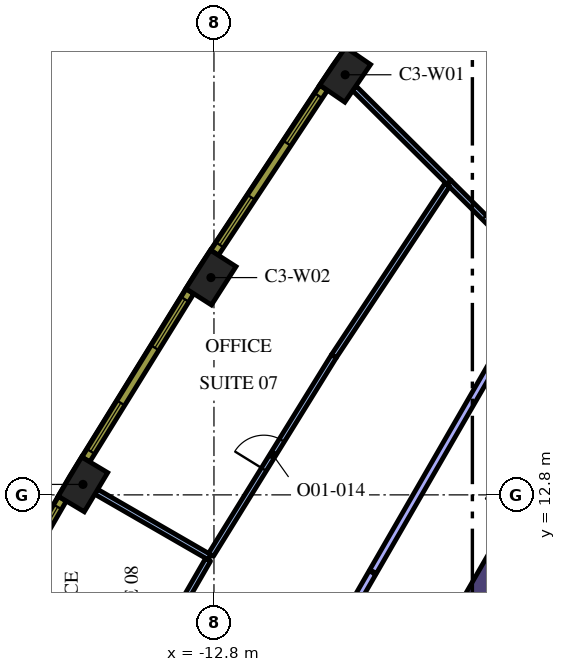
"""IFC4 building model, lengths in metres.
Left out: names, types, materials, properties, quantities, classifications, styles, units other than length and angle.
Written with IfcOpenShell. Run it as: python <this file> out.ifc"""

import sys

from ifc_helpers import new_model, si_unit, direction, frame, frame_2d, origin, origin_2d, place, context, subcontext, project, spatial, rectangle, extrude, element, fill, save


model = new_model("IFC4")
c1 = context("Model", 3, precision=1e-05, world=origin(), true_north=direction((0.0, 1.0)))
c2 = subcontext(c1, "Body", "Model", "MODEL_VIEW")
j1 = project(units=[si_unit("LENGTHUNIT", "METRE"), si_unit("PLANEANGLEUNIT", "RADIAN")], contexts=[c1])
p1 = place(None, origin())
s1 = spatial("IfcSite", under=j1, at=p1, CompositionType="ELEMENT")
p2 = place(p1, origin())
s2 = spatial("IfcBuilding", under=s1, at=p2, CompositionType="ELEMENT")
p3 = place(p2, frame((0.0, 0.0, 145.8)))
s3 = spatial("IfcBuildingStorey", under=s2, at=p3, CompositionType="ELEMENT", Elevation=145.8)
for number, where, z_axis, x_axis in (
    (1, (-9.348, 23.854, 0.0), (0.0, 0.0, 1.0), (-0.565, -0.825, 0.0)),
    (2, (-12.88, 18.517, 0.0), (0.0, 0.0, 1.0), (-0.539, -0.842, 0.0)),
    (3, (-16.247, 13.075, 0.0), (0.0, 0.0, 1.0), (-0.513, -0.858, 0.0)),
):
    element("IfcColumn", number, at=place(p3, frame(where, z_axis=z_axis, x_axis=x_axis)), inside=s3, PredefinedType="COLUMN", context=c2, shape_type="SweptSolid", body=[
        extrude(rectangle(XDim=1.2, YDim=0.8, at=origin_2d()), origin(), (0.0, 0.0, 1.0), 4.2),
    ])
p4 = place(p3, frame((-12.668, -1.842, 0.0), z_axis=(0.0, 0.0, 1.0), x_axis=(0.500003640647, 0.866023301845, 0.0)))
e4 = element("IfcWall", 4, at=p4, inside=s3, PredefinedType="SOLIDWALL", context=c2, shape_type="SweptSolid", body=[
    extrude(rectangle(XDim=15.858, YDim=0.8, at=frame_2d((7.929, 0.0))), origin(), (0.0, 0.0, 1.0), 4.2),
])
p5 = place(p3, frame((-6.613, 21.021, 0.0), z_axis=(0.0, 0.0, 1.0), x_axis=(-0.709222036241, 0.704985179497, 0.0)))
e5 = element("IfcWall", 5, at=p5, inside=s3, PredefinedType="PARTITIONING", context=c2, shape_type="SweptSolid", body=[
    extrude(rectangle(XDim=3.515, YDim=0.15, at=frame_2d((1.757, 0.0))), origin(), (0.0, 0.0, 1.0), 3.15),
])
p6 = place(p3, frame((-6.619, 21.027, 0.0), z_axis=(0.0, 0.0, 1.0), x_axis=(0.709188943058, -0.705018470002, 0.0)))
e6 = element("IfcWall", 6, at=p6, inside=s3, PredefinedType="PARTITIONING", context=c2, shape_type="SweptSolid", body=[
    extrude(rectangle(XDim=3.512, YDim=0.15, at=frame_2d((1.756, 0.0))), origin(), (0.0, 0.0, 1.0), 3.15),
])
p7 = place(p6, frame((1.312, 0.0, 0.0)))
e7 = element("IfcOpeningElement", 7, at=p7, cuts=e6, PredefinedType="OPENING", context=c2, shape_type="SweptSolid", body=[
    extrude(rectangle(XDim=0.9, YDim=2.1, at=frame_2d((0.45, 1.05))), frame((0.0, 0.085, 0.0), z_axis=(0.0, -1.0, 0.0), x_axis=(1.0, 0.0, 0.0)), (0.0, 0.0, 1.0), 0.17),
])
p8 = place(p3, frame((-12.917, 11.16, 0.0), z_axis=(0.0, 0.0, 1.0), x_axis=(-0.866039125629, 0.499976232315, 0.0)))
e8 = element("IfcWall", 8, at=p8, inside=s3, PredefinedType="PARTITIONING", context=c2, shape_type="SweptSolid", body=[
    extrude(rectangle(XDim=3.442, YDim=0.15, at=frame_2d((1.721, 0.0))), origin(), (0.0, 0.0, 1.0), 3.15),
])
p9 = place(p3, frame((-6.658, 20.96, 0.0), z_axis=(0.0, 0.0, 1.0), x_axis=(-0.551907039463, -0.833905642019, 0.0)))
e9 = element("IfcWall", 9, at=p9, inside=s3, PredefinedType="PARTITIONING", context=c2, shape_type="SweptSolid", body=[
    extrude(rectangle(XDim=5.412, YDim=0.15, at=frame_2d((2.706, 0.0))), origin(), (0.0, 0.0, 1.0), 3.15),
])
p10 = place(p3, frame((-12.877, 11.224, 0.0), z_axis=(0.0, 0.0, 1.0), x_axis=(0.526202711334, 0.850359163286, 0.0)))
e10 = element("IfcWall", 10, at=p10, inside=s3, PredefinedType="PARTITIONING", context=c2, shape_type="SweptSolid", body=[
    extrude(rectangle(XDim=6.142, YDim=0.15, at=frame_2d((3.071, 0.0))), origin(), (0.0, 0.0, 1.0), 3.15),
])
p11 = place(p10, frame((2.642, 0.0, 0.0)))
e11 = element("IfcOpeningElement", 11, at=p11, cuts=e10, PredefinedType="OPENING", context=c2, shape_type="SweptSolid", body=[
    extrude(rectangle(XDim=0.9, YDim=2.1, at=frame_2d((0.45, 1.05))), frame((0.0, 0.085, 0.0), z_axis=(0.0, -1.0, 0.0), x_axis=(1.0, 0.0, 0.0)), (0.0, 0.0, 1.0), 0.17),
])
p12 = place(p3, frame((-12.954, 11.095, 0.0), z_axis=(0.0, 0.0, 1.0), x_axis=(-0.500282785331, -0.865862076027, 0.0)))
e12 = element("IfcWall", 12, at=p12, inside=s3, PredefinedType="PARTITIONING", context=c2, shape_type="SweptSolid", body=[
    extrude(rectangle(XDim=6.273, YDim=0.15, at=frame_2d((3.136, 0.0))), origin(), (0.0, 0.0, 1.0), 3.15),
])
p13 = place(p3, frame((-8.628, 10.755, 0.0), z_axis=(0.0, 0.0, 1.0), x_axis=(-0.500004234368, -0.866022959057, 0.0)))
e13 = element("IfcWall", 13, at=p13, inside=s3, PredefinedType="PARTITIONING", context=c2, shape_type="SweptSolid", body=[
    extrude(rectangle(XDim=10.0, YDim=0.2, at=frame_2d((5.0, 0.0))), origin(), (0.0, 0.0, 1.0), 3.15),
])
p14 = place(p13, frame((4.5, 0.0, 0.0)))
e14 = element("IfcOpeningElement", 14, at=p14, cuts=e13, PredefinedType="OPENING", context=c2, shape_type="SweptSolid", body=[
    extrude(rectangle(XDim=1.0, YDim=2.1, at=frame_2d((0.5, 1.05))), frame((0.0, 0.11, 0.0), z_axis=(0.0, -1.0, 0.0), x_axis=(1.0, 0.0, 0.0)), (0.0, 0.0, 1.0), 0.22),
])
p15 = place(p3, frame((-4.167, 18.483, 0.0), z_axis=(0.0, 0.0, 1.0), x_axis=(-0.499974340325, -0.866040217898, 0.0)))
e15 = element("IfcWall", 15, at=p15, inside=s3, PredefinedType="PARTITIONING", context=c2, shape_type="SweptSolid", body=[
    extrude(rectangle(XDim=8.894, YDim=0.2, at=frame_2d((4.447, 0.0))), origin(), (0.0, 0.0, 1.0), 3.15),
])
p16 = place(p3, frame((-6.223, 28.762, 0.0), z_axis=(0.0, 0.0, 1.0), x_axis=(-0.577115207679, -0.816662743772, 0.0)))
e16 = element("IfcWall", 16, at=p16, inside=s3, PredefinedType="SOLIDWALL", context=c2, shape_type="SweptSolid", body=[
    extrude(rectangle(XDim=5.213, YDim=0.24, at=frame_2d((2.606, 0.0))), origin(), (0.0, 0.0, 1.0), 3.95),
])
p17 = place(p16, frame((0.221, 0.0, 0.9)))
e17 = element("IfcOpeningElement", 17, at=p17, cuts=e16, PredefinedType="OPENING", context=c2, shape_type="SweptSolid", body=[
    extrude(rectangle(XDim=1.5, YDim=2.55, at=frame_2d((0.75, 1.275))), frame((0.0, 0.13, 0.0), z_axis=(0.0, -1.0, 0.0), x_axis=(1.0, 0.0, 0.0)), (0.0, 0.0, 1.0), 0.26),
])
p18 = place(p16, frame((3.452, 0.0, 0.9)))
e18 = element("IfcOpeningElement", 18, at=p18, cuts=e16, PredefinedType="OPENING", context=c2, shape_type="SweptSolid", body=[
    extrude(rectangle(XDim=1.5, YDim=2.55, at=frame_2d((0.75, 1.275))), frame((0.0, 0.13, 0.0), z_axis=(0.0, -1.0, 0.0), x_axis=(1.0, 0.0, 0.0)), (0.0, 0.0, 1.0), 0.26),
])
p19 = place(p3, frame((-9.911, 23.51, 0.0), z_axis=(0.0, 0.0, 1.0), x_axis=(-0.551892811511, -0.833915058386, 0.0)))
e19 = element("IfcWall", 19, at=p19, inside=s3, PredefinedType="SOLIDWALL", context=c2, shape_type="SweptSolid", body=[
    extrude(rectangle(XDim=5.204, YDim=0.24, at=frame_2d((2.602, 0.0))), origin(), (0.0, 0.0, 1.0), 3.95),
])
p20 = place(p19, frame((0.248, 0.0, 0.9)))
e20 = element("IfcOpeningElement", 20, at=p20, cuts=e19, PredefinedType="OPENING", context=c2, shape_type="SweptSolid", body=[
    extrude(rectangle(XDim=1.5, YDim=2.55, at=frame_2d((0.75, 1.275))), frame((0.0, 0.13, 0.0), z_axis=(0.0, -1.0, 0.0), x_axis=(1.0, 0.0, 0.0)), (0.0, 0.0, 1.0), 0.26),
])
p21 = place(p19, frame((3.455, 0.0, 0.9)))
e21 = element("IfcOpeningElement", 21, at=p21, cuts=e19, PredefinedType="OPENING", context=c2, shape_type="SweptSolid", body=[
    extrude(rectangle(XDim=1.5, YDim=2.55, at=frame_2d((0.75, 1.275))), frame((0.0, 0.13, 0.0), z_axis=(0.0, -1.0, 0.0), x_axis=(1.0, 0.0, 0.0)), (0.0, 0.0, 1.0), 0.26),
])
p22 = place(p3, frame((-13.433, 18.156, 0.0), z_axis=(0.0, 0.0, 1.0), x_axis=(-0.526197926587, -0.850362124072, 0.0)))
e22 = element("IfcWall", 22, at=p22, inside=s3, PredefinedType="SOLIDWALL", context=c2, shape_type="SweptSolid", body=[
    extrude(rectangle(XDim=5.203, YDim=0.24, at=frame_2d((2.602, 0.0))), origin(), (0.0, 0.0, 1.0), 3.95),
])
p23 = place(p22, frame((0.248, 0.0, 0.9)))
e23 = element("IfcOpeningElement", 23, at=p23, cuts=e22, PredefinedType="OPENING", context=c2, shape_type="SweptSolid", body=[
    extrude(rectangle(XDim=1.5, YDim=2.55, at=frame_2d((0.75, 1.275))), frame((0.0, 0.13, 0.0), z_axis=(0.0, -1.0, 0.0), x_axis=(1.0, 0.0, 0.0)), (0.0, 0.0, 1.0), 0.26),
])
p24 = place(p22, frame((3.455, 0.0, 0.9)))
e24 = element("IfcOpeningElement", 24, at=p24, cuts=e22, PredefinedType="OPENING", context=c2, shape_type="SweptSolid", body=[
    extrude(rectangle(XDim=1.5, YDim=2.55, at=frame_2d((0.75, 1.275))), frame((0.0, 0.13, 0.0), z_axis=(0.0, -1.0, 0.0), x_axis=(1.0, 0.0, 0.0)), (0.0, 0.0, 1.0), 0.26),
])
p25 = place(p3, frame((-16.789, 12.697, 0.0), z_axis=(0.0, 0.0, 1.0), x_axis=(-0.500009456303, -0.866019944116, 0.0)))
e25 = element("IfcWall", 25, at=p25, inside=s3, PredefinedType="SOLIDWALL", context=c2, shape_type="SweptSolid", body=[
    extrude(rectangle(XDim=5.204, YDim=0.24, at=frame_2d((2.602, 0.0))), origin(), (0.0, 0.0, 1.0), 3.95),
])
p26 = place(p25, frame((0.248, 0.0, 0.9)))
e26 = element("IfcOpeningElement", 26, at=p26, cuts=e25, PredefinedType="OPENING", context=c2, shape_type="SweptSolid", body=[
    extrude(rectangle(XDim=1.5, YDim=2.55, at=frame_2d((0.75, 1.275))), frame((0.0, 0.13, 0.0), z_axis=(0.0, -1.0, 0.0), x_axis=(1.0, 0.0, 0.0)), (0.0, 0.0, 1.0), 0.26),
])
p27 = place(p25, frame((3.455, 0.0, 0.9)))
e27 = element("IfcOpeningElement", 27, at=p27, cuts=e25, PredefinedType="OPENING", context=c2, shape_type="SweptSolid", body=[
    extrude(rectangle(XDim=1.5, YDim=2.55, at=frame_2d((0.75, 1.275))), frame((0.0, 0.13, 0.0), z_axis=(0.0, -1.0, 0.0), x_axis=(1.0, 0.0, 0.0)), (0.0, 0.0, 1.0), 0.26),
])
p28 = place(p7, origin())
e28 = element("IfcDoor", 28, at=p28, inside=s3, OperationType="SINGLE_SWING_RIGHT", PredefinedType="DOOR", context=c2, shape_type="SweptSolid", body=[
    extrude(rectangle(XDim=0.9, YDim=2.1, at=frame_2d((0.45, 1.05))), frame((0.0, 0.025, 0.0), z_axis=(0.0, -1.0, 0.0), x_axis=(1.0, 0.0, 0.0)), (0.0, 0.0, 1.0), 0.05),
])
fill(e7, e28)
p29 = place(p11, origin())
e29 = element("IfcDoor", 29, at=p29, inside=s3, OperationType="SINGLE_SWING_RIGHT", PredefinedType="DOOR", context=c2, shape_type="SweptSolid", body=[
    extrude(rectangle(XDim=0.9, YDim=2.1, at=frame_2d((0.45, 1.05))), frame((0.0, 0.025, 0.0), z_axis=(0.0, -1.0, 0.0), x_axis=(1.0, 0.0, 0.0)), (0.0, 0.0, 1.0), 0.05),
])
fill(e11, e29)
p30 = place(p20, origin())
e30 = element("IfcWindow", 30, at=p30, inside=s3, PartitioningType="SINGLE_PANEL", PredefinedType="WINDOW", context=c2, shape_type="SweptSolid", body=[
    extrude(rectangle(XDim=1.5, YDim=2.55, at=frame_2d((0.75, 1.275))), frame((0.0, 0.04, 0.0), z_axis=(0.0, -1.0, 0.0), x_axis=(1.0, 0.0, 0.0)), (0.0, 0.0, 1.0), 0.06),
])
fill(e20, e30)
p31 = place(p21, origin())
e31 = element("IfcWindow", 31, at=p31, inside=s3, PartitioningType="SINGLE_PANEL", PredefinedType="WINDOW", context=c2, shape_type="SweptSolid", body=[
    extrude(rectangle(XDim=1.5, YDim=2.55, at=frame_2d((0.75, 1.275))), frame((0.0, 0.04, 0.0), z_axis=(0.0, -1.0, 0.0), x_axis=(1.0, 0.0, 0.0)), (0.0, 0.0, 1.0), 0.06),
])
fill(e21, e31)
p32 = place(p23, origin())
e32 = element("IfcWindow", 32, at=p32, inside=s3, PartitioningType="SINGLE_PANEL", PredefinedType="WINDOW", context=c2, shape_type="SweptSolid", body=[
    extrude(rectangle(XDim=1.5, YDim=2.55, at=frame_2d((0.75, 1.275))), frame((0.0, 0.04, 0.0), z_axis=(0.0, -1.0, 0.0), x_axis=(1.0, 0.0, 0.0)), (0.0, 0.0, 1.0), 0.06),
])
fill(e23, e32)
p33 = place(p24, origin())
e33 = element("IfcWindow", 33, at=p33, inside=s3, PartitioningType="SINGLE_PANEL", PredefinedType="WINDOW", context=c2, shape_type="SweptSolid", body=[
    extrude(rectangle(XDim=1.5, YDim=2.55, at=frame_2d((0.75, 1.275))), frame((0.0, 0.04, 0.0), z_axis=(0.0, -1.0, 0.0), x_axis=(1.0, 0.0, 0.0)), (0.0, 0.0, 1.0), 0.06),
])
fill(e24, e33)
p34 = place(p26, origin())
e34 = element("IfcWindow", 34, at=p34, inside=s3, PartitioningType="SINGLE_PANEL", PredefinedType="WINDOW", context=c2, shape_type="SweptSolid", body=[
    extrude(rectangle(XDim=1.5, YDim=2.55, at=frame_2d((0.75, 1.275))), frame((0.0, 0.04, 0.0), z_axis=(0.0, -1.0, 0.0), x_axis=(1.0, 0.0, 0.0)), (0.0, 0.0, 1.0), 0.06),
])
fill(e26, e34)
save(model, sys.argv[1])
